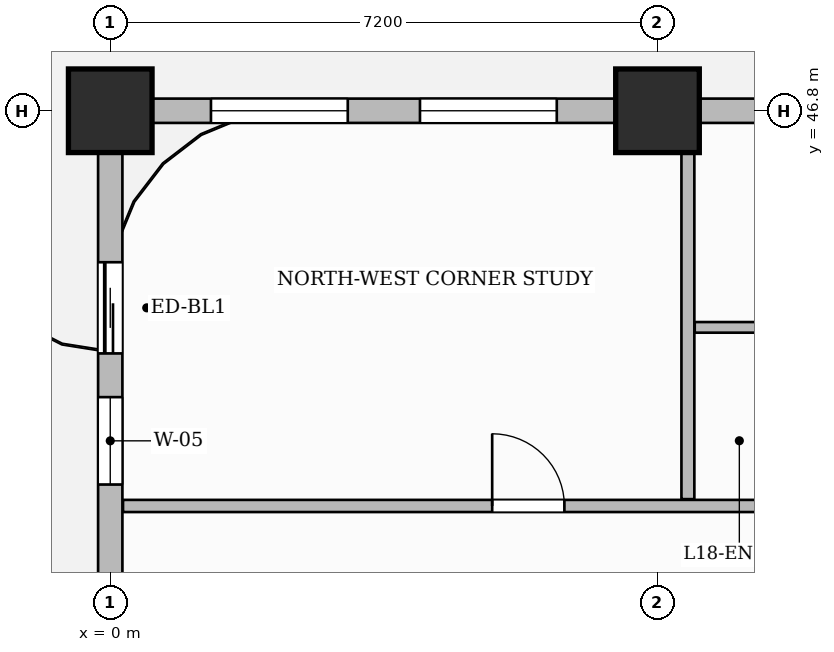
"""IFC4 building model, lengths in metres.
Left out: names, types, materials, properties, quantities, classifications, styles, units other than length and angle.
Written with IfcOpenShell. Run it as: python <this file> out.ifc"""

import sys

from ifc_helpers import new_model, si_unit, direction, frame, frame_2d, origin, origin_2d, place, context, subcontext, project, spatial, rectangle, extrude, source, transform, mapped, element, fill, save


model = new_model("IFC4")
c1 = context("Model", 3, precision=1e-05, world=origin(), true_north=direction((0.0, 1.0)))
c2 = subcontext(c1, "Body", "Model", "MODEL_VIEW")
j1 = project(units=[si_unit("LENGTHUNIT", "METRE"), si_unit("PLANEANGLEUNIT", "RADIAN")], contexts=[c1])
p1 = place(None, origin())
s1 = spatial("IfcSite", under=j1, at=p1, CompositionType="ELEMENT")
p2 = place(p1, origin())
s2 = spatial("IfcBuilding", under=s1, at=p2, CompositionType="ELEMENT")
p3 = place(p2, frame((0.0, 0.0, 76.8)))
s3 = spatial("IfcBuildingStorey", under=s2, at=p3, CompositionType="ELEMENT", Elevation=76.8)
m1 = source(origin(), c2, "Body", "SweptSolid", [
    extrude(rectangle(XDim=1.1, YDim=1.1, at=origin_2d()), origin(), (0.0, 0.0, 1.0), 3.7),
])
for number, where, z_axis, x_axis in (
    (1, (0.0, 46.8, 0.0), (0.0, 0.0, 1.0), (1.0, 0.0, 0.0)),
    (2, (7.2, 46.8, 0.0), (0.0, 0.0, 1.0), (1.0, 0.0, 0.0)),
):
    element("IfcColumn", number, at=place(p3, frame(where, z_axis=z_axis, x_axis=x_axis)), inside=s3, PredefinedType="COLUMN", context=c2, shape_type="MappedRepresentation", body=[
        mapped(m1, transform((0.0, 0.0, 0.0), scale=1.0)),
    ])
p4 = place(p3, frame((7.6, 41.69, 0.0), z_axis=(0.0, 0.0, 1.0), x_axis=(0.0, 1.0, 0.0)))
e3 = element("IfcWall", 3, at=p4, inside=s3, PredefinedType="PARTITIONING", context=c2, shape_type="SweptSolid", body=[
    extrude(rectangle(XDim=4.87, YDim=0.17, at=frame_2d((2.435, 0.0))), origin(), (0.0, 0.0, 1.0), 3.45),
])
p5 = place(p3, frame((0.168, 41.6, 0.0), z_axis=(0.0, 0.0, 1.0), x_axis=(1.0, 0.0, 0.0)))
e4 = element("IfcWall", 4, at=p5, inside=s3, PredefinedType="PARTITIONING", context=c2, shape_type="SweptSolid", body=[
    extrude(rectangle(XDim=14.792, YDim=0.16, at=frame_2d((7.396, 0.0))), origin(), (0.0, 0.0, 1.0), 2.885),
])
p6 = place(p5, frame((4.857, 0.0, 0.0)))
e5 = element("IfcOpeningElement", 5, at=p6, cuts=e4, PredefinedType="OPENING", context=c2, shape_type="SweptSolid", body=[
    extrude(rectangle(XDim=0.95, YDim=2.15, at=frame_2d((0.475, 1.075))), frame((0.0, 0.09, 0.0), z_axis=(0.0, -1.0, 0.0), x_axis=(1.0, 0.0, 0.0)), (0.0, 0.0, 1.0), 0.18),
])
p7 = place(p3, frame((7.69, 43.95, 0.0), z_axis=(0.0, 0.0, 1.0), x_axis=(1.0, 0.0, 0.0)))
e6 = element("IfcWall", 6, at=p7, inside=s3, PredefinedType="PARTITIONING", context=c2, shape_type="SweptSolid", body=[
    extrude(rectangle(XDim=2.07, YDim=0.14, at=frame_2d((1.035, 0.0))), origin(), (0.0, 0.0, 1.0), 2.885),
])
p8 = place(p3, frame((0.0, 25.25, 0.0), z_axis=(0.0, 0.0, 1.0), x_axis=(0.0, 1.0, 0.0)))
e7 = element("IfcWall", 7, at=p8, inside=s3, PredefinedType="SOLIDWALL", context=c2, shape_type="SweptSolid", body=[
    extrude(rectangle(XDim=21.5, YDim=0.32, at=frame_2d((10.75, 0.0))), origin(), (0.0, 0.0, 1.0), 2.885),
])
p9 = place(p8, frame((18.357, 0.0, 0.0)))
e8 = element("IfcOpeningElement", 8, at=p9, cuts=e7, PredefinedType="OPENING", context=c2, shape_type="SweptSolid", body=[
    extrude(rectangle(XDim=1.2, YDim=2.2, at=frame_2d((0.6, 1.1))), frame((0.0, 0.17, 0.0), z_axis=(0.0, -1.0, 0.0), x_axis=(1.0, 0.0, 0.0)), (0.0, 0.0, 1.0), 0.34),
])
p10 = place(p8, frame((0.8, 0.0, 0.0)))
e9 = element("IfcOpeningElement", 9, at=p10, cuts=e7, PredefinedType="OPENING", context=c2, shape_type="SweptSolid", body=[
    extrude(rectangle(XDim=1.2, YDim=2.2, at=frame_2d((0.6, 1.1))), frame((0.0, 0.17, 0.0), z_axis=(0.0, -1.0, 0.0), x_axis=(1.0, 0.0, 0.0)), (0.0, 0.0, 1.0), 0.34),
])
p11 = place(p8, frame((3.425, 0.0, 0.8)))
e10 = element("IfcOpeningElement", 10, at=p11, cuts=e7, PredefinedType="OPENING", context=c2, shape_type="SweptSolid", body=[
    extrude(rectangle(XDim=1.8, YDim=1.85, at=frame_2d((0.9, 0.925))), frame((0.0, 0.17, 0.0), z_axis=(0.0, -1.0, 0.0), x_axis=(1.0, 0.0, 0.0)), (0.0, 0.0, 1.0), 0.34),
])
p12 = place(p8, frame((8.475, 0.0, 0.8)))
e11 = element("IfcOpeningElement", 11, at=p12, cuts=e7, PredefinedType="OPENING", context=c2, shape_type="SweptSolid", body=[
    extrude(rectangle(XDim=1.8, YDim=1.85, at=frame_2d((0.9, 0.925))), frame((0.0, 0.17, 0.0), z_axis=(0.0, -1.0, 0.0), x_axis=(1.0, 0.0, 0.0)), (0.0, 0.0, 1.0), 0.34),
])
p13 = place(p8, frame((11.225, 0.0, 0.8)))
e12 = element("IfcOpeningElement", 12, at=p13, cuts=e7, PredefinedType="OPENING", context=c2, shape_type="SweptSolid", body=[
    extrude(rectangle(XDim=1.8, YDim=1.85, at=frame_2d((0.9, 0.925))), frame((0.0, 0.17, 0.0), z_axis=(0.0, -1.0, 0.0), x_axis=(1.0, 0.0, 0.0)), (0.0, 0.0, 1.0), 0.34),
])
p14 = place(p8, frame((16.632, 0.0, 0.8)))
e13 = element("IfcOpeningElement", 13, at=p14, cuts=e7, PredefinedType="OPENING", context=c2, shape_type="SweptSolid", body=[
    extrude(rectangle(XDim=1.15, YDim=1.8, at=frame_2d((0.575, 0.9))), frame((0.0, 0.17, 0.0), z_axis=(0.0, -1.0, 0.0), x_axis=(1.0, 0.0, 0.0)), (0.0, 0.0, 1.0), 0.34),
])
p15 = place(p3, frame((0.0, 46.8, 0.0), z_axis=(0.0, 0.0, 1.0), x_axis=(1.0, 0.0, 0.0)))
e14 = element("IfcWall", 14, at=p15, inside=s3, PredefinedType="SOLIDWALL", context=c2, shape_type="SweptSolid", body=[
    extrude(rectangle(XDim=18.0, YDim=0.32, at=frame_2d((9.0, 0.0))), origin(), (0.0, 0.0, 1.0), 2.885),
])
p16 = place(p15, frame((1.325, 0.0, 0.8)))
e15 = element("IfcOpeningElement", 15, at=p16, cuts=e14, PredefinedType="OPENING", context=c2, shape_type="SweptSolid", body=[
    extrude(rectangle(XDim=1.8, YDim=1.85, at=frame_2d((0.9, 0.925))), frame((0.0, 0.17, 0.0), z_axis=(0.0, -1.0, 0.0), x_axis=(1.0, 0.0, 0.0)), (0.0, 0.0, 1.0), 0.34),
])
p17 = place(p15, frame((4.075, 0.0, 0.8)))
e16 = element("IfcOpeningElement", 16, at=p17, cuts=e14, PredefinedType="OPENING", context=c2, shape_type="SweptSolid", body=[
    extrude(rectangle(XDim=1.8, YDim=1.85, at=frame_2d((0.9, 0.925))), frame((0.0, 0.17, 0.0), z_axis=(0.0, -1.0, 0.0), x_axis=(1.0, 0.0, 0.0)), (0.0, 0.0, 1.0), 0.34),
])
p18 = place(p15, frame((8.525, 0.0, 0.8)))
e17 = element("IfcOpeningElement", 17, at=p18, cuts=e14, PredefinedType="OPENING", context=c2, shape_type="SweptSolid", body=[
    extrude(rectangle(XDim=1.8, YDim=1.85, at=frame_2d((0.9, 0.925))), frame((0.0, 0.17, 0.0), z_axis=(0.0, -1.0, 0.0), x_axis=(1.0, 0.0, 0.0)), (0.0, 0.0, 1.0), 0.34),
])
p19 = place(p15, frame((11.275, 0.0, 0.8)))
e18 = element("IfcOpeningElement", 18, at=p19, cuts=e14, PredefinedType="OPENING", context=c2, shape_type="SweptSolid", body=[
    extrude(rectangle(XDim=1.8, YDim=1.85, at=frame_2d((0.9, 0.925))), frame((0.0, 0.17, 0.0), z_axis=(0.0, -1.0, 0.0), x_axis=(1.0, 0.0, 0.0)), (0.0, 0.0, 1.0), 0.34),
])
p20 = place(p15, frame((15.5, 0.0, 0.8)))
e19 = element("IfcOpeningElement", 19, at=p20, cuts=e14, PredefinedType="OPENING", context=c2, shape_type="SweptSolid", body=[
    extrude(rectangle(XDim=1.4, YDim=1.85, at=frame_2d((0.7, 0.925))), frame((0.0, 0.17, 0.0), z_axis=(0.0, -1.0, 0.0), x_axis=(1.0, 0.0, 0.0)), (0.0, 0.0, 1.0), 0.34),
])
m2 = source(origin(), c2, "Body", "SweptSolid", [
    extrude(rectangle(XDim=0.95, YDim=2.15, at=frame_2d((0.475, 1.075))), frame((0.0, 0.025, 0.0), z_axis=(0.0, -1.0, 0.0), x_axis=(1.0, 0.0, 0.0)), (0.0, 0.0, 1.0), 0.05),
])
p21 = place(p6, origin())
e20 = element("IfcDoor", 20, at=p21, inside=s3, OperationType="SINGLE_SWING_LEFT", PredefinedType="DOOR", context=c2, shape_type="MappedRepresentation", body=[
    mapped(m2, transform((0.0, 0.0, 0.0), scale=1.0)),
])
fill(e5, e20)
m3 = source(origin(), c2, "Body", "SweptSolid", [
    extrude(rectangle(XDim=1.2, YDim=2.2, at=frame_2d((0.6, 1.1))), frame((0.0, 0.025, 0.0), z_axis=(0.0, -1.0, 0.0), x_axis=(1.0, 0.0, 0.0)), (0.0, 0.0, 1.0), 0.05),
])
p22 = place(p9, origin())
e21 = element("IfcDoor", 21, at=p22, inside=s3, OperationType="SLIDING_TO_LEFT", PredefinedType="DOOR", context=c2, shape_type="MappedRepresentation", body=[
    mapped(m3, transform((0.0, 0.0, 0.0), scale=1.0)),
])
fill(e8, e21)
m4 = source(origin(), c2, "Body", "SweptSolid", [
    extrude(rectangle(XDim=1.15, YDim=1.8, at=frame_2d((0.575, 0.9))), frame((0.0, 0.03, 0.0), z_axis=(0.0, -1.0, 0.0), x_axis=(1.0, 0.0, 0.0)), (0.0, 0.0, 1.0), 0.06),
])
p23 = place(p14, origin())
e22 = element("IfcWindow", 22, at=p23, inside=s3, PartitioningType="SINGLE_PANEL", PredefinedType="WINDOW", context=c2, shape_type="MappedRepresentation", body=[
    mapped(m4, transform((0.0, 0.0, 0.0), scale=1.0)),
])
fill(e13, e22)
m5 = source(origin(), c2, "Body", "SweptSolid", [
    extrude(rectangle(XDim=1.8, YDim=1.85, at=frame_2d((0.9, 0.925))), frame((0.0, 0.03, 0.0), z_axis=(0.0, -1.0, 0.0), x_axis=(1.0, 0.0, 0.0)), (0.0, 0.0, 1.0), 0.06),
])
p24 = place(p16, origin())
e23 = element("IfcWindow", 23, at=p24, inside=s3, PartitioningType="DOUBLE_PANEL_VERTICAL", PredefinedType="WINDOW", context=c2, shape_type="MappedRepresentation", body=[
    mapped(m5, transform((0.0, 0.0, 0.0), scale=1.0)),
])
fill(e15, e23)
p25 = place(p17, origin())
e24 = element("IfcWindow", 24, at=p25, inside=s3, PartitioningType="DOUBLE_PANEL_VERTICAL", PredefinedType="WINDOW", context=c2, shape_type="MappedRepresentation", body=[
    mapped(m5, transform((0.0, 0.0, 0.0), scale=1.0)),
])
fill(e16, e24)
save(model, sys.argv[1])
